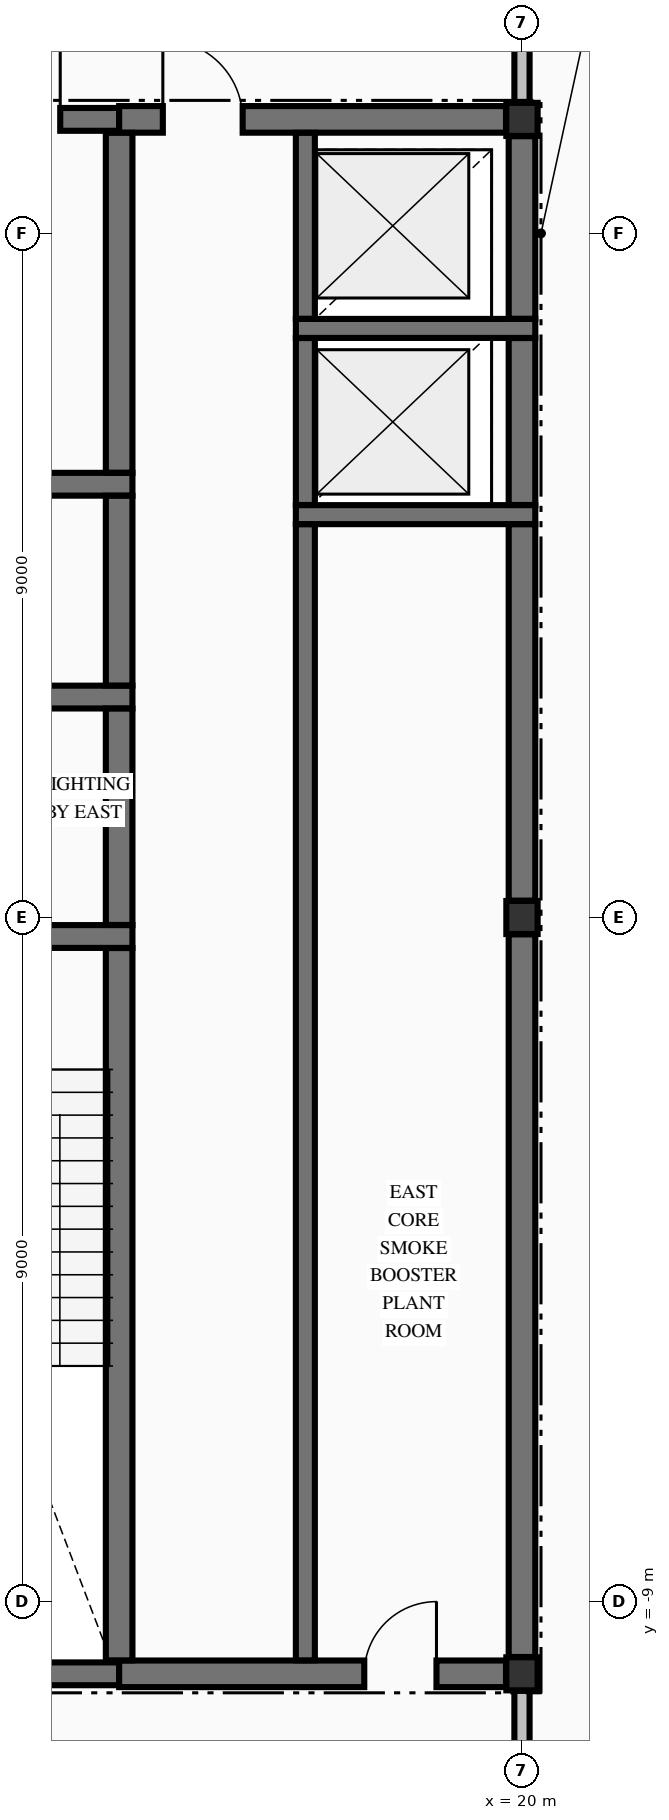
"""IFC4 building model, lengths in metres.
Left out: names, types, materials, properties, quantities, classifications, styles, units other than length and angle.
Written with IfcOpenShell. Run it as: python <this file> out.ifc"""

import sys

from ifc_helpers import new_model, si_unit, direction, frame, frame_2d, origin, origin_2d, place, context, subcontext, project, spatial, rectangle, i_section, extrude, element, fill, save


model = new_model("IFC4")
c1 = context("Model", 3, precision=1e-05, world=origin(), true_north=direction((0.0, 1.0)))
c2 = subcontext(c1, "Body", "Model", "MODEL_VIEW")
j1 = project(units=[si_unit("LENGTHUNIT", "METRE"), si_unit("PLANEANGLEUNIT", "RADIAN")], contexts=[c1])
p1 = place(None, origin())
s1 = spatial("IfcSite", under=j1, at=p1, CompositionType="ELEMENT")
p2 = place(p1, origin())
s2 = spatial("IfcBuilding", under=s1, at=p2, CompositionType="ELEMENT")
p3 = place(p2, frame((0.0, 0.0, 222.06)))
s3 = spatial("IfcBuildingStorey", under=s2, at=p3, CompositionType="ELEMENT", Elevation=222.06)
for number, where, z_axis, x_axis in (
    (1, (20.0, -9.95, -0.425), (0.0, 0.0, 1.0), (1.0, 0.0, 0.0)),
    (2, (20.0, 10.5, -0.425), (0.0, 0.0, 1.0), (1.0, 0.0, 0.0)),
    (3, (20.0, 0.0, -0.425), (0.0, 0.0, 1.0), (1.0, 0.0, 0.0)),
):
    element("IfcColumn", number, at=place(p3, frame(where, z_axis=z_axis, x_axis=x_axis)), inside=s3, PredefinedType="COLUMN", context=c2, shape_type="SweptSolid", body=[
        extrude(i_section(OverallWidth=0.412, OverallDepth=0.435, WebThickness=0.036, FlangeThickness=0.058, FilletRadius=0.015, at=origin_2d()), origin(), (0.0, 0.0, 1.0), 4.76),
    ])
p4 = place(p3, frame((11.21, -9.95, 0.0), z_axis=(0.0, 0.0, 1.0), x_axis=(1.0, 0.0, 0.0)))
e4 = element("IfcWall", 4, at=p4, inside=s3, PredefinedType="SHEAR", context=c2, shape_type="SweptSolid", body=[
    extrude(rectangle(XDim=3.49, YDim=0.3, at=frame_2d((1.745, 0.0))), origin(), (0.0, 0.0, 1.0), 4.335),
])
p5 = place(p3, frame((14.7, -9.95, 0.0), z_axis=(0.0, 0.0, 1.0), x_axis=(1.0, 0.0, 0.0)))
e5 = element("IfcWall", 5, at=p5, inside=s3, PredefinedType="SHEAR", context=c2, shape_type="SweptSolid", body=[
    extrude(rectangle(XDim=5.09, YDim=0.35, at=frame_2d((2.545, 0.0))), origin(), (0.0, 0.0, 1.0), 4.335),
])
p6 = place(p5, frame((3.225, 0.0, 0.0)))
e6 = element("IfcOpeningElement", 6, at=p6, cuts=e5, PredefinedType="OPENING", context=c2, shape_type="SweptSolid", body=[
    extrude(rectangle(XDim=0.95, YDim=2.15, at=frame_2d((0.475, 1.075))), frame((0.0, 0.185, 0.0), z_axis=(0.0, -1.0, 0.0), x_axis=(1.0, 0.0, 0.0)), (0.0, 0.0, 1.0), 0.37),
])
p7 = place(p3, frame((11.21, -0.25, 0.0), z_axis=(0.0, 0.0, 1.0), x_axis=(1.0, 0.0, 0.0)))
e7 = element("IfcWall", 7, at=p7, inside=s3, PredefinedType="SHEAR", context=c2, shape_type="SweptSolid", body=[
    extrude(rectangle(XDim=3.665, YDim=0.3, at=frame_2d((1.833, 0.0))), origin(), (0.0, 0.0, 1.0), 4.335),
])
p8 = place(p7, frame((1.39, 0.0, 0.0)))
e8 = element("IfcOpeningElement", 8, at=p8, cuts=e7, PredefinedType="OPENING", context=c2, shape_type="SweptSolid", body=[
    extrude(rectangle(XDim=1.1, YDim=2.15, at=frame_2d((0.55, 1.075))), frame((0.0, 0.16, 0.0), z_axis=(0.0, -1.0, 0.0), x_axis=(1.0, 0.0, 0.0)), (0.0, 0.0, 1.0), 0.32),
])
p9 = place(p3, frame((10.85, 2.9, 0.0), z_axis=(0.0, 0.0, 1.0), x_axis=(1.0, 0.0, 0.0)))
e9 = element("IfcWall", 9, at=p9, inside=s3, PredefinedType="SHEAR", context=c2, shape_type="SweptSolid", body=[
    extrude(rectangle(XDim=4.025, YDim=0.3, at=frame_2d((2.012, 0.0))), origin(), (0.0, 0.0, 1.0), 4.335),
])
p10 = place(p9, frame((0.85, 0.0, 0.0)))
e10 = element("IfcOpeningElement", 10, at=p10, cuts=e9, PredefinedType="OPENING", context=c2, shape_type="SweptSolid", body=[
    extrude(rectangle(XDim=1.1, YDim=2.2, at=frame_2d((0.55, 1.1))), frame((0.0, 0.16, 0.0), z_axis=(0.0, -1.0, 0.0), x_axis=(1.0, 0.0, 0.0)), (0.0, 0.0, 1.0), 0.32),
])
p11 = place(p3, frame((17.025, 5.3, 0.0), z_axis=(0.0, 0.0, 1.0), x_axis=(1.0, 0.0, 0.0)))
e11 = element("IfcWall", 11, at=p11, inside=s3, PredefinedType="SOLIDWALL", context=c2, shape_type="SweptSolid", body=[
    extrude(rectangle(XDim=3.15, YDim=0.25, at=frame_2d((1.575, 0.0))), origin(), (0.0, 0.0, 1.0), 4.335),
])
p12 = place(p3, frame((10.85, 5.7, 0.0), z_axis=(0.0, 0.0, 1.0), x_axis=(1.0, 0.0, 0.0)))
e12 = element("IfcWall", 12, at=p12, inside=s3, PredefinedType="SHEAR", context=c2, shape_type="SweptSolid", body=[
    extrude(rectangle(XDim=4.025, YDim=0.3, at=frame_2d((2.012, 0.0))), origin(), (0.0, 0.0, 1.0), 4.335),
])
p13 = place(p3, frame((17.025, 7.75, 0.0), z_axis=(0.0, 0.0, 1.0), x_axis=(1.0, 0.0, 0.0)))
e13 = element("IfcWall", 13, at=p13, inside=s3, PredefinedType="SOLIDWALL", context=c2, shape_type="SweptSolid", body=[
    extrude(rectangle(XDim=3.15, YDim=0.25, at=frame_2d((1.575, 0.0))), origin(), (0.0, 0.0, 1.0), 4.335),
])
p14 = place(p3, frame((11.21, 10.5, 0.0), z_axis=(0.0, 0.0, 1.0), x_axis=(1.0, 0.0, 0.0)))
e14 = element("IfcWall", 14, at=p14, inside=s3, PredefinedType="SHEAR", context=c2, shape_type="SweptSolid", body=[
    extrude(rectangle(XDim=3.49, YDim=0.3, at=frame_2d((1.745, 0.0))), origin(), (0.0, 0.0, 1.0), 4.335),
])
p15 = place(p14, frame((1.765, 0.0, 0.0)))
e15 = element("IfcOpeningElement", 15, at=p15, cuts=e14, PredefinedType="OPENING", context=c2, shape_type="SweptSolid", body=[
    extrude(rectangle(XDim=0.95, YDim=2.15, at=frame_2d((0.475, 1.075))), frame((0.0, 0.16, 0.0), z_axis=(0.0, -1.0, 0.0), x_axis=(1.0, 0.0, 0.0)), (0.0, 0.0, 1.0), 0.32),
])
p16 = place(p3, frame((14.7, 10.5, 0.0), z_axis=(0.0, 0.0, 1.0), x_axis=(1.0, 0.0, 0.0)))
e16 = element("IfcWall", 16, at=p16, inside=s3, PredefinedType="SHEAR", context=c2, shape_type="SweptSolid", body=[
    extrude(rectangle(XDim=5.09, YDim=0.35, at=frame_2d((2.545, 0.0))), origin(), (0.0, 0.0, 1.0), 4.335),
])
p17 = place(p16, frame((0.575, 0.0, 0.0)))
e17 = element("IfcOpeningElement", 17, at=p17, cuts=e16, PredefinedType="OPENING", context=c2, shape_type="SweptSolid", body=[
    extrude(rectangle(XDim=1.05, YDim=2.15, at=frame_2d((0.525, 1.075))), frame((0.0, 0.185, 0.0), z_axis=(0.0, -1.0, 0.0), x_axis=(1.0, 0.0, 0.0)), (0.0, 0.0, 1.0), 0.37),
])
p18 = place(p3, frame((14.7, -9.773, 0.0), z_axis=(0.0, 0.0, 1.0), x_axis=(0.0, 1.0, 0.0)))
e18 = element("IfcWall", 18, at=p18, inside=s3, PredefinedType="SHEAR", context=c2, shape_type="SweptSolid", body=[
    extrude(rectangle(XDim=9.371, YDim=0.35, at=frame_2d((4.686, 0.0))), origin(), (0.0, 0.0, 1.0), 4.335),
])
p19 = place(p3, frame((14.7, -0.098, 0.0), z_axis=(0.0, 0.0, 1.0), x_axis=(0.0, 1.0, 0.0)))
e19 = element("IfcWall", 19, at=p19, inside=s3, PredefinedType="SHEAR", context=c2, shape_type="SweptSolid", body=[
    extrude(rectangle(XDim=2.846, YDim=0.35, at=frame_2d((1.423, 0.0))), origin(), (0.0, 0.0, 1.0), 4.335),
])
p20 = place(p3, frame((14.7, 3.052, 0.0), z_axis=(0.0, 0.0, 1.0), x_axis=(0.0, 1.0, 0.0)))
e20 = element("IfcWall", 20, at=p20, inside=s3, PredefinedType="SHEAR", context=c2, shape_type="SweptSolid", body=[
    extrude(rectangle(XDim=2.496, YDim=0.35, at=frame_2d((1.248, 0.0))), origin(), (0.0, 0.0, 1.0), 4.335),
])
p21 = place(p3, frame((14.7, 5.852, 0.0), z_axis=(0.0, 0.0, 1.0), x_axis=(0.0, 1.0, 0.0)))
e21 = element("IfcWall", 21, at=p21, inside=s3, PredefinedType="SHEAR", context=c2, shape_type="SweptSolid", body=[
    extrude(rectangle(XDim=4.471, YDim=0.35, at=frame_2d((2.235, 0.0))), origin(), (0.0, 0.0, 1.0), 4.335),
])
p22 = place(p3, frame((17.15, -9.773, 0.0), z_axis=(0.0, 0.0, 1.0), x_axis=(0.0, 1.0, 0.0)))
e22 = element("IfcWall", 22, at=p22, inside=s3, PredefinedType="SOLIDWALL", context=c2, shape_type="SweptSolid", body=[
    extrude(rectangle(XDim=14.946, YDim=0.25, at=frame_2d((7.473, 0.0))), origin(), (0.0, 0.0, 1.0), 4.335),
])
p23 = place(p3, frame((17.15, 5.427, 0.0), z_axis=(0.0, 0.0, 1.0), x_axis=(0.0, 1.0, 0.0)))
e23 = element("IfcWall", 23, at=p23, inside=s3, PredefinedType="SOLIDWALL", context=c2, shape_type="SweptSolid", body=[
    extrude(rectangle(XDim=2.196, YDim=0.25, at=frame_2d((1.098, 0.0))), origin(), (0.0, 0.0, 1.0), 4.335),
])
p24 = place(p3, frame((17.15, 7.877, 0.0), z_axis=(0.0, 0.0, 1.0), x_axis=(0.0, 1.0, 0.0)))
e24 = element("IfcWall", 24, at=p24, inside=s3, PredefinedType="SOLIDWALL", context=c2, shape_type="SweptSolid", body=[
    extrude(rectangle(XDim=2.446, YDim=0.25, at=frame_2d((1.223, 0.0))), origin(), (0.0, 0.0, 1.0), 4.335),
])
p25 = place(p3, frame((20.0, -9.729, 0.0), z_axis=(0.0, 0.0, 1.0), x_axis=(0.0, 1.0, 0.0)))
e25 = element("IfcWall", 25, at=p25, inside=s3, PredefinedType="SHEAR", context=c2, shape_type="SweptSolid", body=[
    extrude(rectangle(XDim=9.507, YDim=0.35, at=frame_2d((4.753, 0.0))), origin(), (0.0, 0.0, 1.0), 4.335),
])
p26 = place(p3, frame((20.0, 0.221, 0.0), z_axis=(0.0, 0.0, 1.0), x_axis=(0.0, 1.0, 0.0)))
e26 = element("IfcWall", 26, at=p26, inside=s3, PredefinedType="SHEAR", context=c2, shape_type="SweptSolid", body=[
    extrude(rectangle(XDim=4.952, YDim=0.35, at=frame_2d((2.476, 0.0))), origin(), (0.0, 0.0, 1.0), 4.335),
])
p27 = place(p3, frame((20.0, 5.427, 0.0), z_axis=(0.0, 0.0, 1.0), x_axis=(0.0, 1.0, 0.0)))
e27 = element("IfcWall", 27, at=p27, inside=s3, PredefinedType="SHEAR", context=c2, shape_type="SweptSolid", body=[
    extrude(rectangle(XDim=2.196, YDim=0.35, at=frame_2d((1.098, 0.0))), origin(), (0.0, 0.0, 1.0), 4.335),
])
p28 = place(p3, frame((20.0, 7.877, 0.0), z_axis=(0.0, 0.0, 1.0), x_axis=(0.0, 1.0, 0.0)))
e28 = element("IfcWall", 28, at=p28, inside=s3, PredefinedType="SHEAR", context=c2, shape_type="SweptSolid", body=[
    extrude(rectangle(XDim=2.402, YDim=0.35, at=frame_2d((1.201, 0.0))), origin(), (0.0, 0.0, 1.0), 4.335),
])
p29 = place(p3, frame((20.0, -12.697, 0.0), z_axis=(0.0, 0.0, 1.0), x_axis=(0.0, 1.0, 0.0)))
e29 = element("IfcWall", 29, at=p29, inside=s3, PredefinedType="PARTITIONING", context=c2, shape_type="SweptSolid", body=[
    extrude(rectangle(XDim=2.523, YDim=0.2, at=frame_2d((1.262, 0.0))), origin(), (0.0, 0.0, 1.0), 4.335),
])
p30 = place(p3, frame((20.0, 10.723, 0.0), z_axis=(0.0, 0.0, 1.0), x_axis=(0.0, 1.0, 0.0)))
e30 = element("IfcWall", 30, at=p30, inside=s3, PredefinedType="PARTITIONING", context=c2, shape_type="SweptSolid", body=[
    extrude(rectangle(XDim=1.974, YDim=0.2, at=frame_2d((0.987, 0.0))), origin(), (0.0, 0.0, 1.0), 4.335),
])
p31 = place(p15, origin())
e31 = element("IfcDoor", 31, at=p31, inside=s3, OperationType="SINGLE_SWING_RIGHT", PredefinedType="DOOR", context=c2, shape_type="SweptSolid", body=[
    extrude(rectangle(XDim=0.95, YDim=2.15, at=frame_2d((0.475, 1.075))), frame((0.0, 0.025, 0.0), z_axis=(0.0, -1.0, 0.0), x_axis=(1.0, 0.0, 0.0)), (0.0, 0.0, 1.0), 0.05),
])
fill(e15, e31)
p32 = place(p17, origin())
e32 = element("IfcDoor", 32, at=p32, inside=s3, OperationType="SINGLE_SWING_LEFT", PredefinedType="DOOR", context=c2, shape_type="SweptSolid", body=[
    extrude(rectangle(XDim=1.05, YDim=2.15, at=frame_2d((0.525, 1.075))), frame((0.0, 0.025, 0.0), z_axis=(0.0, -1.0, 0.0), x_axis=(1.0, 0.0, 0.0)), (0.0, 0.0, 1.0), 0.05),
])
fill(e17, e32)
p33 = place(p6, origin())
e33 = element("IfcDoor", 33, at=p33, inside=s3, OperationType="SINGLE_SWING_RIGHT", PredefinedType="DOOR", context=c2, shape_type="SweptSolid", body=[
    extrude(rectangle(XDim=0.95, YDim=2.15, at=frame_2d((0.475, 1.075))), frame((0.0, 0.025, 0.0), z_axis=(0.0, -1.0, 0.0), x_axis=(1.0, 0.0, 0.0)), (0.0, 0.0, 1.0), 0.05),
])
fill(e6, e33)
save(model, sys.argv[1])
